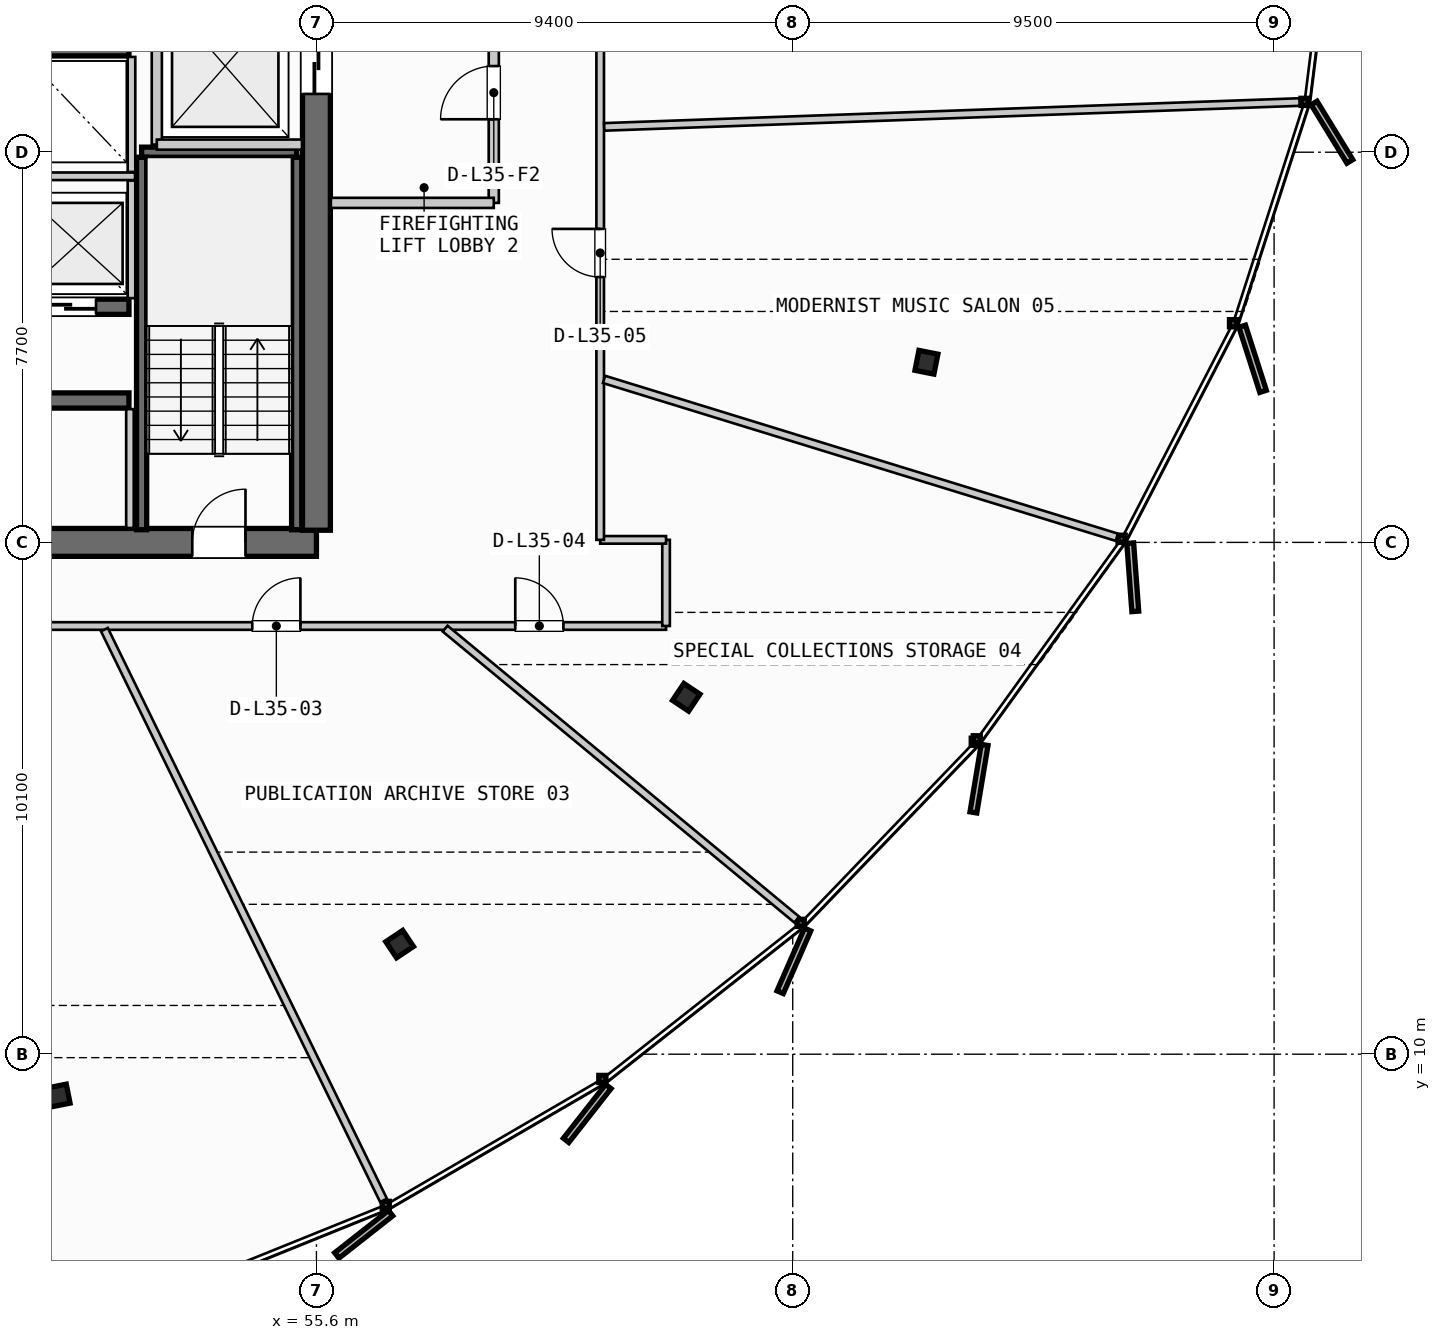
"""IFC4 building model, lengths in metres.
Left out: names, types, materials, properties, quantities, classifications, styles, units other than length and angle.
Written with IfcOpenShell. Run it as: python <this file> out.ifc"""

import sys

from ifc_helpers import new_model, si_unit, direction, frame, frame_2d, origin, origin_2d, place, context, subcontext, project, spatial, rectangle, i_section, extrude, source, transform, mapped, element, fill, save


model = new_model("IFC4")
c1 = context("Model", 3, precision=1e-05, world=origin(), true_north=direction((0.0, 1.0)))
c2 = subcontext(c1, "Body", "Model", "MODEL_VIEW")
j1 = project(units=[si_unit("LENGTHUNIT", "METRE"), si_unit("PLANEANGLEUNIT", "RADIAN")], contexts=[c1])
p1 = place(None, origin())
s1 = spatial("IfcSite", under=j1, at=p1, CompositionType="ELEMENT")
p2 = place(p1, origin())
s2 = spatial("IfcBuilding", under=s1, at=p2, CompositionType="ELEMENT")
p3 = place(p2, frame((0.0, 0.0, 139.45)))
s3 = spatial("IfcBuildingStorey", under=s2, at=p3, CompositionType="ELEMENT", Elevation=139.45)
p4 = place(p3, frame((38.0, 20.1, 0.0), z_axis=(0.0, 0.0, 1.0), x_axis=(1.0, 0.0, 0.0)))
e1 = element("IfcWall", 1, at=p4, inside=s3, PredefinedType="SHEAR", context=c2, shape_type="SweptSolid", body=[
    extrude(rectangle(XDim=17.6, YDim=0.55, at=frame_2d((8.8, 0.0))), origin(), (0.0, 0.0, 1.0), 3.3),
])
p5 = place(p4, frame((1.4, 0.0, 0.0)))
e2 = element("IfcOpeningElement", 2, at=p5, cuts=e1, PredefinedType="OPENING", context=c2, shape_type="SweptSolid", body=[
    extrude(rectangle(XDim=1.05, YDim=2.15, at=frame_2d((0.525, 1.075))), frame((0.0, 0.285, 0.0), z_axis=(0.0, -1.0, 0.0), x_axis=(1.0, 0.0, 0.0)), (0.0, 0.0, 1.0), 0.57),
])
p6 = place(p4, frame((15.15, 0.0, 0.0)))
e3 = element("IfcOpeningElement", 3, at=p6, cuts=e1, PredefinedType="OPENING", context=c2, shape_type="SweptSolid", body=[
    extrude(rectangle(XDim=1.05, YDim=2.15, at=frame_2d((0.525, 1.075))), frame((0.0, 0.285, 0.0), z_axis=(0.0, -1.0, 0.0), x_axis=(1.0, 0.0, 0.0)), (0.0, 0.0, 1.0), 0.57),
])
p7 = place(p4, frame((5.25, 0.0, 0.0)))
e4 = element("IfcOpeningElement", 4, at=p7, cuts=e1, PredefinedType="OPENING", context=c2, shape_type="SweptSolid", body=[
    extrude(rectangle(XDim=0.95, YDim=2.15, at=frame_2d((0.475, 1.075))), frame((0.0, 0.285, 0.0), z_axis=(0.0, -1.0, 0.0), x_axis=(1.0, 0.0, 0.0)), (0.0, 0.0, 1.0), 0.57),
])
p8 = place(p4, frame((11.4, 0.0, 0.0)))
e5 = element("IfcOpeningElement", 5, at=p8, cuts=e1, PredefinedType="OPENING", context=c2, shape_type="SweptSolid", body=[
    extrude(rectangle(XDim=0.95, YDim=2.15, at=frame_2d((0.475, 1.075))), frame((0.0, 0.285, 0.0), z_axis=(0.0, -1.0, 0.0), x_axis=(1.0, 0.0, 0.0)), (0.0, 0.0, 1.0), 0.57),
])
p9 = place(p3, frame((55.6, 20.34, 0.0), z_axis=(0.0, 0.0, 1.0), x_axis=(0.0, 1.0, 0.0)))
e6 = element("IfcWall", 6, at=p9, inside=s3, PredefinedType="SHEAR", context=c2, shape_type="SweptSolid", body=[
    extrude(rectangle(XDim=14.92, YDim=0.55, at=frame_2d((7.46, 0.0))), origin(), (0.0, 0.0, 1.0), 3.3),
])
p10 = place(p9, frame((12.71, 0.0, 0.0)))
e7 = element("IfcOpeningElement", 7, at=p10, cuts=e6, PredefinedType="OPENING", context=c2, shape_type="SweptSolid", body=[
    extrude(rectangle(XDim=1.05, YDim=2.15, at=frame_2d((0.525, 1.075))), frame((0.0, 0.285, 0.0), z_axis=(0.0, -1.0, 0.0), x_axis=(1.0, 0.0, 0.0)), (0.0, 0.0, 1.0), 0.57),
])
p11 = place(p9, frame((8.61, 0.0, 0.0)))
e8 = element("IfcOpeningElement", 8, at=p11, cuts=e6, PredefinedType="OPENING", context=c2, shape_type="SweptSolid", body=[
    extrude(rectangle(XDim=1.1, YDim=2.2, at=frame_2d((0.55, 1.1))), frame((0.0, 0.285, 0.0), z_axis=(0.0, -1.0, 0.0), x_axis=(1.0, 0.0, 0.0)), (0.0, 0.0, 1.0), 0.57),
])
p12 = place(p3, frame((47.65, 22.9, 0.0), z_axis=(0.0, 0.0, 1.0), x_axis=(1.0, 0.0, 0.0)))
e9 = element("IfcWall", 9, at=p12, inside=s3, PredefinedType="SHEAR", context=c2, shape_type="SweptSolid", body=[
    extrude(rectangle(XDim=4.25, YDim=0.3, at=frame_2d((2.125, 0.0))), origin(), (0.0, 0.0, 1.0), 3.3),
])
p13 = place(p3, frame((47.65, 24.75, 0.0), z_axis=(0.0, 0.0, 1.0), x_axis=(1.0, 0.0, 0.0)))
e10 = element("IfcWall", 10, at=p13, inside=s3, PredefinedType="SHEAR", context=c2, shape_type="SweptSolid", body=[
    extrude(rectangle(XDim=4.25, YDim=0.3, at=frame_2d((2.125, 0.0))), origin(), (0.0, 0.0, 1.0), 3.3),
])
p14 = place(p13, frame((0.45, 0.0, 0.0)))
e11 = element("IfcOpeningElement", 11, at=p14, cuts=e10, PredefinedType="OPENING", context=c2, shape_type="SweptSolid", body=[
    extrude(rectangle(XDim=1.1, YDim=2.2, at=frame_2d((0.55, 1.1))), frame((0.0, 0.16, 0.0), z_axis=(0.0, -1.0, 0.0), x_axis=(1.0, 0.0, 0.0)), (0.0, 0.0, 1.0), 0.32),
])
p15 = place(p13, frame((2.5, 0.0, 0.0)))
e12 = element("IfcOpeningElement", 12, at=p15, cuts=e10, PredefinedType="OPENING", context=c2, shape_type="SweptSolid", body=[
    extrude(rectangle(XDim=1.1, YDim=2.2, at=frame_2d((0.55, 1.1))), frame((0.0, 0.16, 0.0), z_axis=(0.0, -1.0, 0.0), x_axis=(1.0, 0.0, 0.0)), (0.0, 0.0, 1.0), 0.32),
])
p16 = place(p3, frame((47.65, 29.85, 0.0), z_axis=(0.0, 0.0, 1.0), x_axis=(1.0, 0.0, 0.0)))
e13 = element("IfcWall", 13, at=p16, inside=s3, PredefinedType="SHEAR", context=c2, shape_type="SweptSolid", body=[
    extrude(rectangle(XDim=4.25, YDim=0.3, at=frame_2d((2.125, 0.0))), origin(), (0.0, 0.0, 1.0), 3.3),
])
m1 = source(origin(), c2, "Body", "SweptSolid", [
    extrude(i_section(OverallWidth=0.401, OverallDepth=0.381, WebThickness=0.032, FlangeThickness=0.051, FilletRadius=0.015, at=origin_2d()), origin(), (0.0, 0.0, 1.0), 3.3),
])
for number, where, z_axis, x_axis in (
    (14, (50.503, 9.182, 0.0), (0.0, 0.0, 1.0), (0.195, -0.981, 0.0)),
    (15, (57.242, 12.172, 0.0), (0.0, 0.0, 1.0), (0.556, -0.831, 0.0)),
    (16, (62.899, 17.043, 0.0), (0.0, 0.0, 1.0), (0.831, -0.556, 0.0)),
    (17, (67.639, 23.655, 0.0), (0.0, 0.0, 1.0), (0.981, -0.195, 0.0)),
):
    element("IfcColumn", number, at=place(p3, frame(where, z_axis=z_axis, x_axis=x_axis)), inside=s3, PredefinedType="COLUMN", context=c2, shape_type="MappedRepresentation", body=[
        mapped(m1, transform((0.0, 0.0, 0.0), scale=1.0)),
    ])
p17 = place(p3, frame((52.15, 27.8, 0.0), z_axis=(0.0, 0.0, 1.0), x_axis=(1.0, 0.0, 0.0)))
e18 = element("IfcWall", 18, at=p17, inside=s3, PredefinedType="SHEAR", context=c2, shape_type="SweptSolid", body=[
    extrude(rectangle(XDim=3.06, YDim=0.2, at=frame_2d((1.53, 0.0))), origin(), (0.0, 0.0, 1.0), 3.3),
])
for number, where, z_axis, x_axis in (
    (19, (55.21, 27.7, 0.0), (0.0, 0.0, 1.0), (0.0, -1.0, 0.0)),
    (20, (52.15, 20.35, 0.0), (0.0, 0.0, 1.0), (0.0, 1.0, 0.0)),
):
    element("IfcWall", number, at=place(p3, frame(where, z_axis=z_axis, x_axis=x_axis)), inside=s3, PredefinedType="SHEAR", context=c2, shape_type="SweptSolid", body=[
        extrude(rectangle(XDim=7.35, YDim=0.2, at=frame_2d((3.675, 0.0))), origin(), (0.0, 0.0, 1.0), 3.3),
    ])
p18 = place(p3, frame((52.45, 27.95, 0.0), z_axis=(0.0, 0.0, 1.0), x_axis=(0.0, 1.0, 0.0)))
e21 = element("IfcWall", 21, at=p18, inside=s3, PredefinedType="PARTITIONING", context=c2, shape_type="SweptSolid", body=[
    extrude(rectangle(XDim=3.1, YDim=0.2, at=frame_2d((1.55, 0.0))), origin(), (0.0, 0.0, 1.0), 2.305),
])
p19 = place(p3, frame((52.45, 27.95, 0.0), z_axis=(0.0, 0.0, 1.0), x_axis=(1.0, 0.0, 0.0)))
e22 = element("IfcWall", 22, at=p19, inside=s3, PredefinedType="PARTITIONING", context=c2, shape_type="SweptSolid", body=[
    extrude(rectangle(XDim=2.865, YDim=0.2, at=frame_2d((1.433, 0.0))), origin(), (0.0, 0.0, 1.0), 2.305),
])
p20 = place(p3, frame((59.1, 26.8, 0.0), z_axis=(0.0, 0.0, 1.0), x_axis=(0.0, 1.0, 0.0)))
e23 = element("IfcWall", 23, at=p20, inside=s3, PredefinedType="PARTITIONING", context=c2, shape_type="SweptSolid", body=[
    extrude(rectangle(XDim=4.4, YDim=0.2, at=frame_2d((2.2, 0.0))), origin(), (0.0, 0.0, 1.0), 2.305),
])
p21 = place(p20, frame((1.65, 0.0, 0.0)))
e24 = element("IfcOpeningElement", 24, at=p21, cuts=e23, PredefinedType="OPENING", context=c2, shape_type="SweptSolid", body=[
    extrude(rectangle(XDim=1.05, YDim=2.15, at=frame_2d((0.525, 1.075))), frame((0.0, 0.11, 0.0), z_axis=(0.0, -1.0, 0.0), x_axis=(1.0, 0.0, 0.0)), (0.0, 0.0, 1.0), 0.22),
])
p22 = place(p3, frame((55.885, 26.8, 0.0), z_axis=(0.0, 0.0, 1.0), x_axis=(1.0, 0.0, 0.0)))
e25 = element("IfcWall", 25, at=p22, inside=s3, PredefinedType="PARTITIONING", context=c2, shape_type="SweptSolid", body=[
    extrude(rectangle(XDim=3.215, YDim=0.2, at=frame_2d((1.607, 0.0))), origin(), (0.0, 0.0, 1.0), 2.305),
])
p23 = place(p3, frame((51.92, 20.385, 0.0), z_axis=(0.0, 0.0, 1.0), x_axis=(0.0, 1.0, 0.0)))
e26 = element("IfcWall", 26, at=p23, inside=s3, PredefinedType="PARTITIONING", context=c2, shape_type="SweptSolid", body=[
    extrude(rectangle(XDim=2.345, YDim=0.15, at=frame_2d((1.172, 0.0))), origin(), (0.0, 0.0, 1.0), 2.305),
])
p24 = place(p3, frame((47.7, 27.325, 0.0), z_axis=(0.0, 0.0, 1.0), x_axis=(1.0, 0.0, 0.0)))
e27 = element("IfcWall", 27, at=p24, inside=s3, PredefinedType="PARTITIONING", context=c2, shape_type="SweptSolid", body=[
    extrude(rectangle(XDim=4.32, YDim=0.15, at=frame_2d((2.16, 0.0))), origin(), (0.0, 0.0, 1.0), 2.305),
])
p25 = place(p3, frame((51.95, 24.92, 0.0), z_axis=(0.0, 0.0, 1.0), x_axis=(0.0, 1.0, 0.0)))
e28 = element("IfcWall", 28, at=p25, inside=s3, PredefinedType="PARTITIONING", context=c2, shape_type="SweptSolid", body=[
    extrude(rectangle(XDim=2.32, YDim=0.15, at=frame_2d((1.16, 0.0))), origin(), (0.0, 0.0, 1.0), 2.305),
])
p26 = place(p3, frame((51.95, 27.41, 0.0), z_axis=(0.0, 0.0, 1.0), x_axis=(0.0, 1.0, 0.0)))
e29 = element("IfcWall", 29, at=p26, inside=s3, PredefinedType="PARTITIONING", context=c2, shape_type="SweptSolid", body=[
    extrude(rectangle(XDim=2.27, YDim=0.15, at=frame_2d((1.135, 0.0))), origin(), (0.0, 0.0, 1.0), 2.305),
])
p27 = place(p3, frame((31.1, 18.45, 0.0), z_axis=(0.0, 0.0, 1.0), x_axis=(1.0, 0.0, 0.0)))
e30 = element("IfcWall", 30, at=p27, inside=s3, PredefinedType="PARTITIONING", context=c2, shape_type="SweptSolid", body=[
    extrude(rectangle(XDim=31.4, YDim=0.15, at=frame_2d((15.7, 0.0))), origin(), (0.0, 0.0, 1.0), 2.305),
])
p28 = place(p27, frame((8.433, 0.0, 0.0)))
e31 = element("IfcOpeningElement", 31, at=p28, cuts=e30, PredefinedType="OPENING", context=c2, shape_type="SweptSolid", body=[
    extrude(rectangle(XDim=0.95, YDim=2.15, at=frame_2d((0.475, 1.075))), frame((0.0, 0.085, 0.0), z_axis=(0.0, -1.0, 0.0), x_axis=(1.0, 0.0, 0.0)), (0.0, 0.0, 1.0), 0.17),
])
p29 = place(p27, frame((15.861, 0.0, 0.0)))
e32 = element("IfcOpeningElement", 32, at=p29, cuts=e30, PredefinedType="OPENING", context=c2, shape_type="SweptSolid", body=[
    extrude(rectangle(XDim=0.95, YDim=2.15, at=frame_2d((0.475, 1.075))), frame((0.0, 0.085, 0.0), z_axis=(0.0, -1.0, 0.0), x_axis=(1.0, 0.0, 0.0)), (0.0, 0.0, 1.0), 0.17),
])
p30 = place(p27, frame((23.234, 0.0, 0.0)))
e33 = element("IfcOpeningElement", 33, at=p30, cuts=e30, PredefinedType="OPENING", context=c2, shape_type="SweptSolid", body=[
    extrude(rectangle(XDim=0.95, YDim=2.15, at=frame_2d((0.475, 1.075))), frame((0.0, 0.085, 0.0), z_axis=(0.0, -1.0, 0.0), x_axis=(1.0, 0.0, 0.0)), (0.0, 0.0, 1.0), 0.17),
])
p31 = place(p27, frame((28.424, 0.0, 0.0)))
e34 = element("IfcOpeningElement", 34, at=p31, cuts=e30, PredefinedType="OPENING", context=c2, shape_type="SweptSolid", body=[
    extrude(rectangle(XDim=0.95, YDim=2.15, at=frame_2d((0.475, 1.075))), frame((0.0, 0.085, 0.0), z_axis=(0.0, -1.0, 0.0), x_axis=(1.0, 0.0, 0.0)), (0.0, 0.0, 1.0), 0.17),
])
p32 = place(p3, frame((62.5, 18.45, 0.0), z_axis=(0.0, 0.0, 1.0), x_axis=(0.0, 1.0, 0.0)))
e35 = element("IfcWall", 35, at=p32, inside=s3, PredefinedType="PARTITIONING", context=c2, shape_type="SweptSolid", body=[
    extrude(rectangle(XDim=1.7, YDim=0.15, at=frame_2d((0.85, 0.0))), origin(), (0.0, 0.0, 1.0), 2.305),
])
p33 = place(p3, frame((62.5, 20.15, 0.0), z_axis=(0.0, 0.0, 1.0), x_axis=(-1.0, 0.0, 0.0)))
e36 = element("IfcWall", 36, at=p33, inside=s3, PredefinedType="PARTITIONING", context=c2, shape_type="SweptSolid", body=[
    extrude(rectangle(XDim=1.3, YDim=0.15, at=frame_2d((0.65, 0.0))), origin(), (0.0, 0.0, 1.0), 2.305),
])
p34 = place(p3, frame((61.2, 20.15, 0.0), z_axis=(0.0, 0.0, 1.0), x_axis=(0.0, 1.0, 0.0)))
e37 = element("IfcWall", 37, at=p34, inside=s3, PredefinedType="PARTITIONING", context=c2, shape_type="SweptSolid", body=[
    extrude(rectangle(XDim=15.3, YDim=0.15, at=frame_2d((7.65, 0.0))), origin(), (0.0, 0.0, 1.0), 2.305),
])
p35 = place(p34, frame((5.187, 0.0, 0.0)))
e38 = element("IfcOpeningElement", 38, at=p35, cuts=e37, PredefinedType="OPENING", context=c2, shape_type="SweptSolid", body=[
    extrude(rectangle(XDim=0.95, YDim=2.15, at=frame_2d((0.475, 1.075))), frame((0.0, 0.085, 0.0), z_axis=(0.0, -1.0, 0.0), x_axis=(1.0, 0.0, 0.0)), (0.0, 0.0, 1.0), 0.17),
])
p36 = place(p34, frame((10.958, 0.0, 0.0)))
e39 = element("IfcOpeningElement", 39, at=p36, cuts=e37, PredefinedType="OPENING", context=c2, shape_type="SweptSolid", body=[
    extrude(rectangle(XDim=0.95, YDim=2.15, at=frame_2d((0.475, 1.075))), frame((0.0, 0.085, 0.0), z_axis=(0.0, -1.0, 0.0), x_axis=(1.0, 0.0, 0.0)), (0.0, 0.0, 1.0), 0.17),
])
p37 = place(p3, frame((51.416, 18.378, 0.0), z_axis=(0.0, 0.0, 1.0), x_axis=(0.439375681954, -0.898303406488, 0.0)))
e40 = element("IfcWall", 40, at=p37, inside=s3, PredefinedType="PARTITIONING", context=c2, shape_type="SweptSolid", body=[
    extrude(rectangle(XDim=12.537, YDim=0.15, at=frame_2d((6.268, 0.0))), origin(), (0.0, 0.0, 1.0), 2.305),
])
p38 = place(p3, frame((58.14, 18.399, 0.0), z_axis=(0.0, 0.0, 1.0), x_axis=(0.770404878425, -0.637554957081, 0.0)))
e41 = element("IfcWall", 41, at=p38, inside=s3, PredefinedType="PARTITIONING", context=c2, shape_type="SweptSolid", body=[
    extrude(rectangle(XDim=9.009, YDim=0.15, at=frame_2d((4.504, 0.0))), origin(), (0.0, 0.0, 1.0), 2.305),
])
p39 = place(p3, frame((61.277, 23.316, 0.0), z_axis=(0.0, 0.0, 1.0), x_axis=(0.955750087547, -0.294179826218, 0.0)))
e42 = element("IfcWall", 42, at=p39, inside=s3, PredefinedType="PARTITIONING", context=c2, shape_type="SweptSolid", body=[
    extrude(rectangle(XDim=10.588, YDim=0.15, at=frame_2d((5.294, 0.0))), origin(), (0.0, 0.0, 1.0), 2.305),
])
p40 = place(p3, frame((61.28, 28.3, 0.0), z_axis=(0.0, 0.0, 1.0), x_axis=(0.999361789329, 0.035721338578, 0.0)))
e43 = element("IfcWall", 43, at=p40, inside=s3, PredefinedType="PARTITIONING", context=c2, shape_type="SweptSolid", body=[
    extrude(rectangle(XDim=13.731, YDim=0.15, at=frame_2d((6.865, 0.0))), origin(), (0.0, 0.0, 1.0), 2.305),
])
m2 = source(origin(), c2, "Body", "SweptSolid", [
    extrude(rectangle(XDim=1.05, YDim=2.15, at=frame_2d((0.525, 1.075))), frame((0.0, 0.025, 0.0), z_axis=(0.0, -1.0, 0.0), x_axis=(1.0, 0.0, 0.0)), (0.0, 0.0, 1.0), 0.05),
])
p41 = place(p6, origin())
e44 = element("IfcDoor", 44, at=p41, inside=s3, OperationType="SINGLE_SWING_RIGHT", PredefinedType="DOOR", context=c2, shape_type="MappedRepresentation", body=[
    mapped(m2, transform((0.0, 0.0, 0.0), scale=1.0)),
])
fill(e3, e44)
m3 = source(origin(), c2, "Body", "SweptSolid", [
    extrude(rectangle(XDim=1.1, YDim=2.2, at=frame_2d((0.55, 1.1))), frame((0.0, 0.025, 0.0), z_axis=(0.0, -1.0, 0.0), x_axis=(1.0, 0.0, 0.0)), (0.0, 0.0, 1.0), 0.05),
])
p42 = place(p11, origin())
e45 = element("IfcDoor", 45, at=p42, inside=s3, OperationType="SLIDING_TO_RIGHT", PredefinedType="DOOR", context=c2, shape_type="MappedRepresentation", body=[
    mapped(m3, transform((0.0, 0.0, 0.0), scale=1.0)),
])
fill(e8, e45)
p43 = place(p15, origin())
e46 = element("IfcDoor", 46, at=p43, inside=s3, OperationType="SLIDING_TO_RIGHT", PredefinedType="DOOR", context=c2, shape_type="MappedRepresentation", body=[
    mapped(m3, transform((0.0, 0.0, 0.0), scale=1.0)),
])
fill(e12, e46)
p44 = place(p21, origin())
e47 = element("IfcDoor", 47, at=p44, inside=s3, OperationType="SINGLE_SWING_LEFT", PredefinedType="DOOR", context=c2, shape_type="MappedRepresentation", body=[
    mapped(m2, transform((0.0, 0.0, 0.0), scale=1.0)),
])
fill(e24, e47)
m4 = source(origin(), c2, "Body", "SweptSolid", [
    extrude(rectangle(XDim=0.95, YDim=2.15, at=frame_2d((0.475, 1.075))), frame((0.0, 0.025, 0.0), z_axis=(0.0, -1.0, 0.0), x_axis=(1.0, 0.0, 0.0)), (0.0, 0.0, 1.0), 0.05),
])
p45 = place(p30, origin())
e48 = element("IfcDoor", 48, at=p45, inside=s3, OperationType="SINGLE_SWING_RIGHT", PredefinedType="DOOR", context=c2, shape_type="MappedRepresentation", body=[
    mapped(m4, transform((0.0, 0.0, 0.0), scale=1.0)),
])
fill(e33, e48)
p46 = place(p31, origin())
e49 = element("IfcDoor", 49, at=p46, inside=s3, OperationType="SINGLE_SWING_LEFT", PredefinedType="DOOR", context=c2, shape_type="MappedRepresentation", body=[
    mapped(m4, transform((0.0, 0.0, 0.0), scale=1.0)),
])
fill(e34, e49)
p47 = place(p35, origin())
e50 = element("IfcDoor", 50, at=p47, inside=s3, OperationType="SINGLE_SWING_RIGHT", PredefinedType="DOOR", context=c2, shape_type="MappedRepresentation", body=[
    mapped(m4, transform((0.0, 0.0, 0.0), scale=1.0)),
])
fill(e38, e50)
save(model, sys.argv[1])
